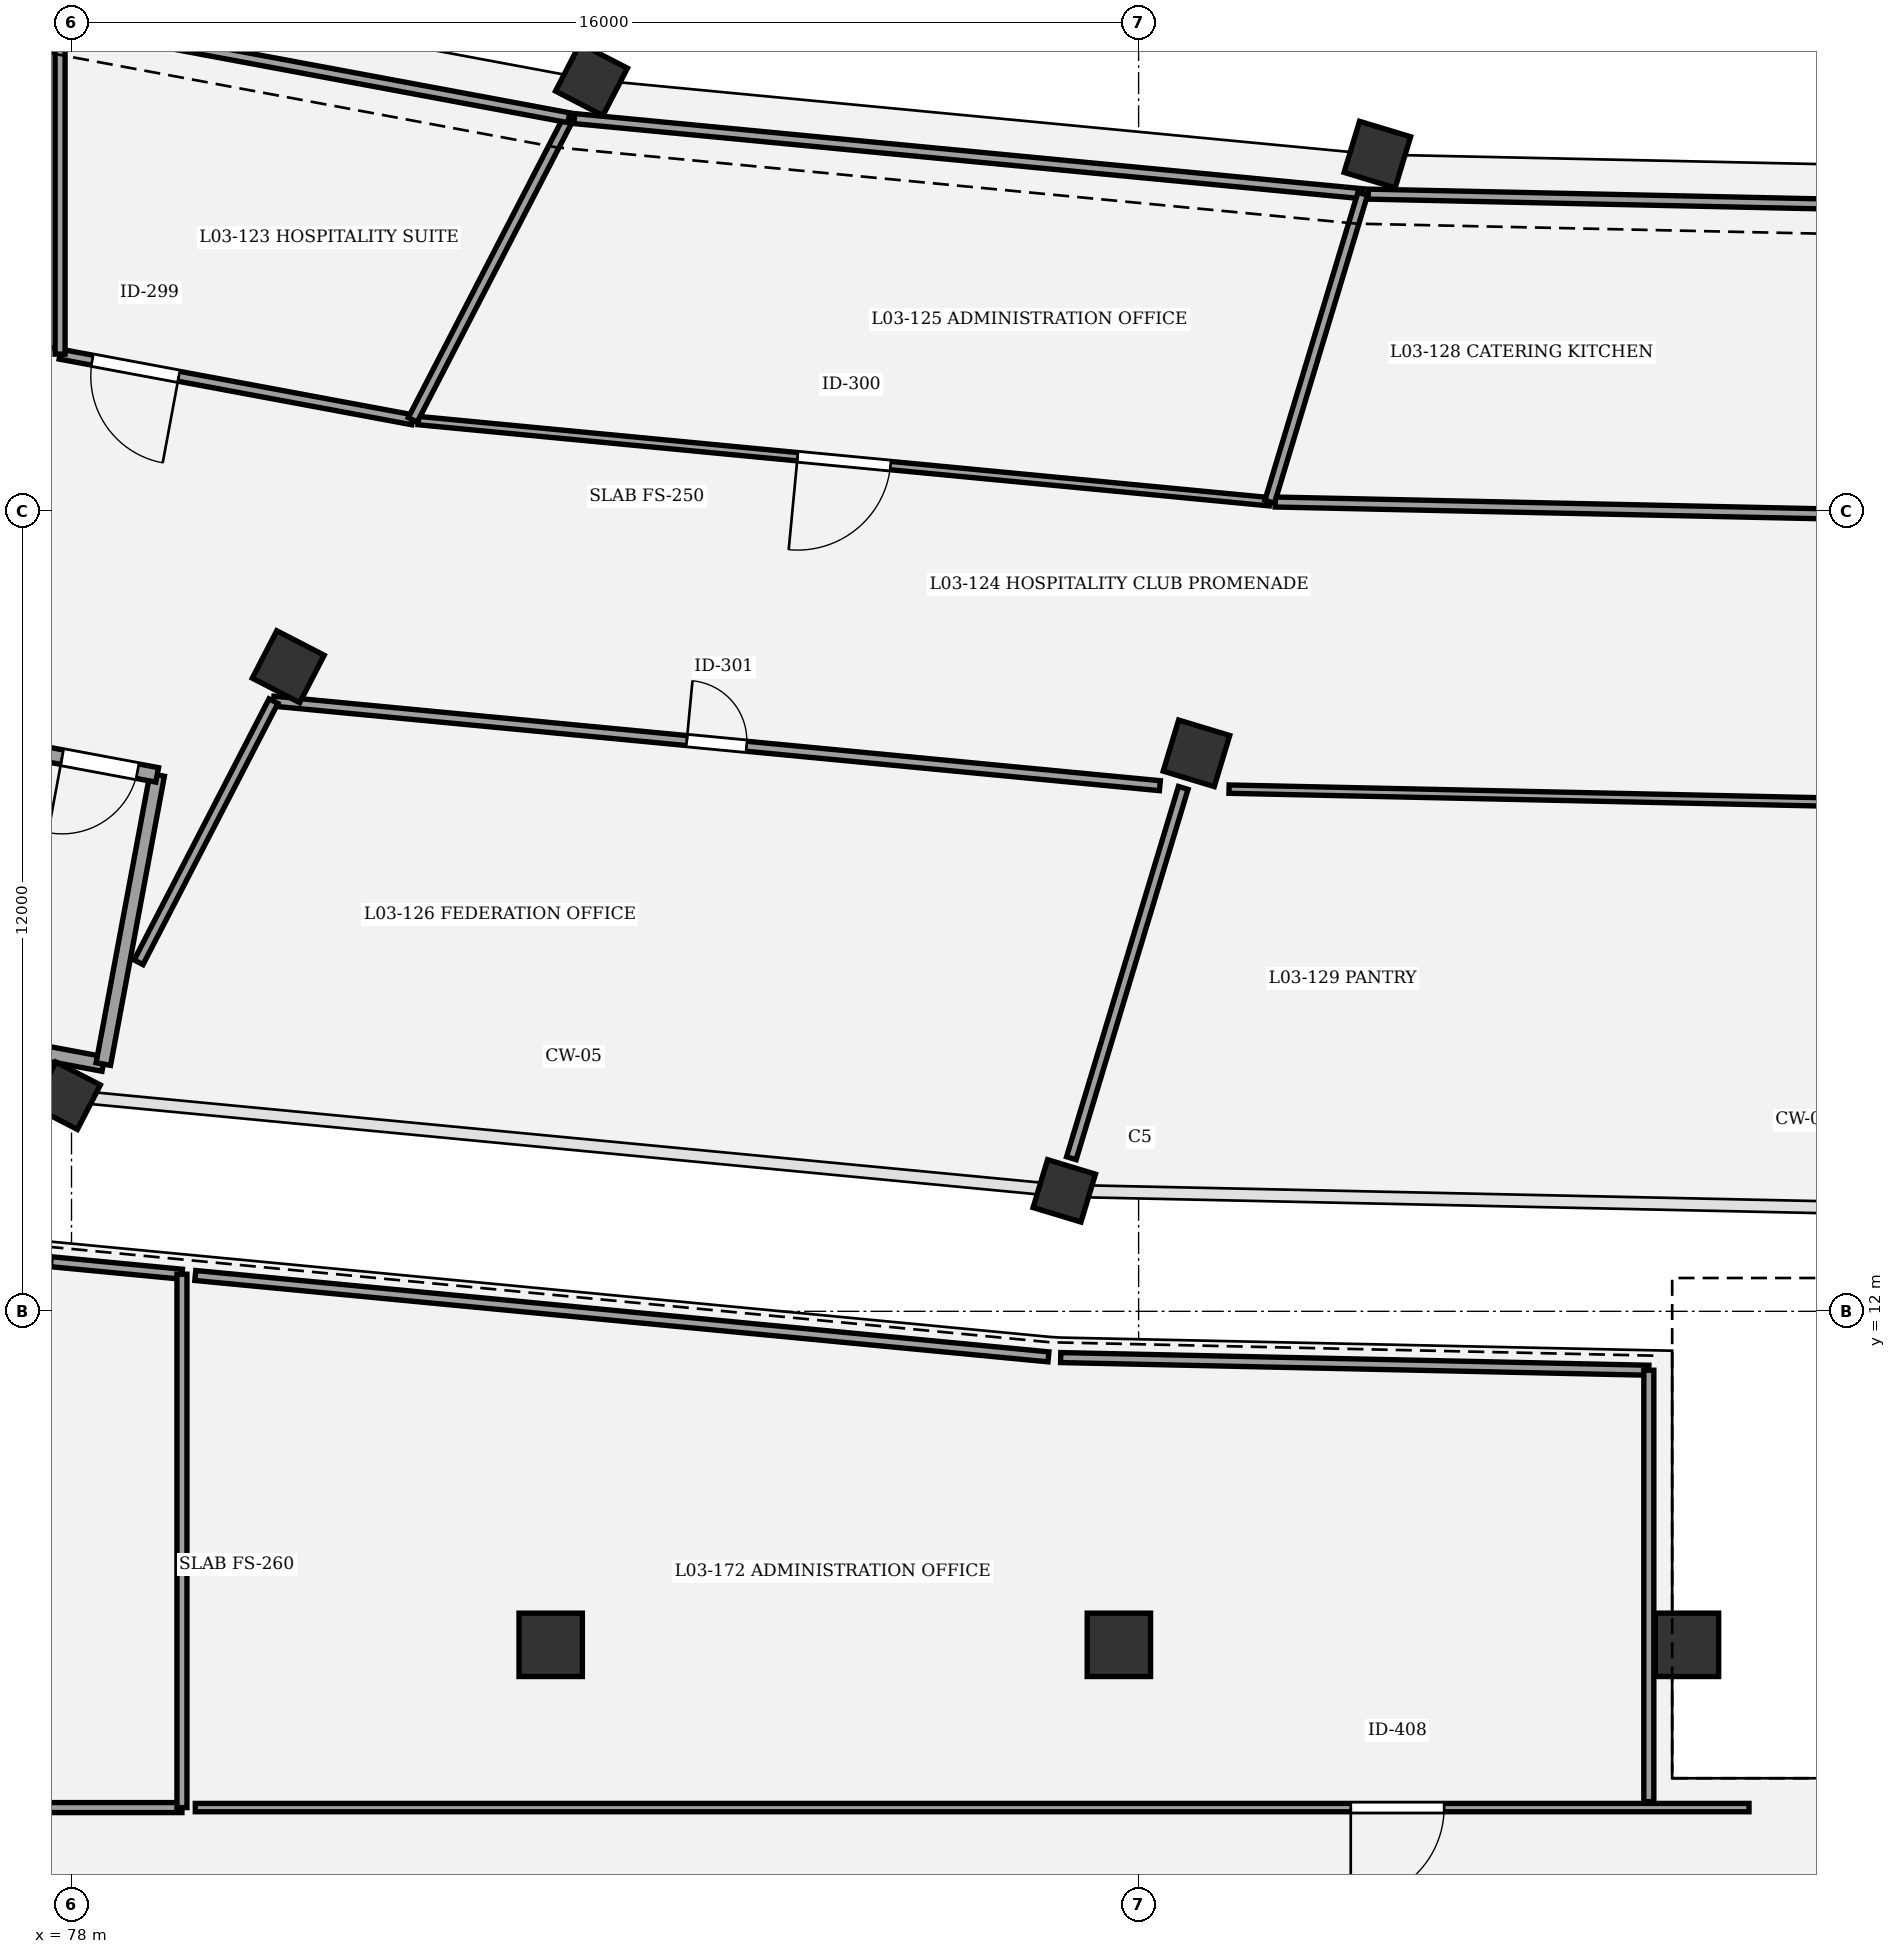
"""IFC4 building model, lengths in metres.
Left out: names, types, materials, properties, quantities, classifications, styles, units other than length and angle.
Written with IfcOpenShell. Run it as: python <this file> out.ifc"""

import sys

from ifc_helpers import new_model, si_unit, direction, frame, frame_2d, origin, origin_2d, place, context, subcontext, project, spatial, rectangle, circle, extrude, element, fill, save


model = new_model("IFC4")
c1 = context("Model", 3, precision=1e-05, world=origin(), true_north=direction((0.0, 1.0)))
c2 = subcontext(c1, "Body", "Model", "MODEL_VIEW")
j1 = project(units=[si_unit("LENGTHUNIT", "METRE"), si_unit("PLANEANGLEUNIT", "RADIAN")], contexts=[c1])
p1 = place(None, origin())
s1 = spatial("IfcSite", under=j1, at=p1, CompositionType="ELEMENT")
p2 = place(p1, origin())
s2 = spatial("IfcBuilding", under=s1, at=p2, CompositionType="ELEMENT")
p3 = place(p2, frame((0.0, 0.0, 14.7)))
s3 = spatial("IfcBuildingStorey", under=s2, at=p3, CompositionType="ELEMENT", Elevation=14.7)
p4 = place(p3, frame((85.796, 30.466, 0.0), z_axis=(0.0, 0.0, 1.0), x_axis=(-0.458959712465, -0.888457079624, 0.0)))
e1 = element("IfcColumn", 1, at=p4, inside=s3, PredefinedType="COLUMN", context=c2, shape_type="SweptSolid", body=[
    extrude(rectangle(XDim=0.8, YDim=0.8, at=origin_2d()), origin(), (0.0, 0.0, 1.0), 2.85),
])
p5 = place(p3, frame((81.25, 21.665, 0.0), z_axis=(0.0, 0.0, 1.0), x_axis=(-0.458959712465, -0.888457079624, 0.0)))
e2 = element("IfcColumn", 2, at=p5, inside=s3, PredefinedType="COLUMN", context=c2, shape_type="SweptSolid", body=[
    extrude(rectangle(XDim=0.8, YDim=0.8, at=origin_2d()), origin(), (0.0, 0.0, 1.0), 4.5),
])
p6 = place(p3, frame((77.927, 15.233, 0.0), z_axis=(0.0, 0.0, 1.0), x_axis=(-0.458959712465, -0.888457079624, 0.0)))
e3 = element("IfcColumn", 3, at=p6, inside=s3, PredefinedType="COLUMN", context=c2, shape_type="SweptSolid", body=[
    extrude(rectangle(XDim=0.75, YDim=0.75, at=origin_2d()), origin(), (0.0, 0.0, 1.0), 4.5),
])
p7 = place(p3, frame((97.58, 29.343, 0.0), z_axis=(0.0, 0.0, 1.0), x_axis=(-0.289198876314, -0.957269037387, 0.0)))
e4 = element("IfcColumn", 4, at=p7, inside=s3, PredefinedType="COLUMN", context=c2, shape_type="SweptSolid", body=[
    extrude(rectangle(XDim=0.8, YDim=0.8, at=origin_2d()), origin(), (0.0, 0.0, 1.0), 2.85),
])
p8 = place(p3, frame((94.867, 20.366, 0.0), z_axis=(0.0, 0.0, 1.0), x_axis=(-0.289198876314, -0.957269037387, 0.0)))
e5 = element("IfcColumn", 5, at=p8, inside=s3, PredefinedType="COLUMN", context=c2, shape_type="SweptSolid", body=[
    extrude(rectangle(XDim=0.8, YDim=0.8, at=origin_2d()), origin(), (0.0, 0.0, 1.0), 4.5),
])
p9 = place(p3, frame((92.885, 13.806, 0.0), z_axis=(0.0, 0.0, 1.0), x_axis=(-0.289198876314, -0.957269037387, 0.0)))
e6 = element("IfcColumn", 6, at=p9, inside=s3, PredefinedType="COLUMN", context=c2, shape_type="SweptSolid", body=[
    extrude(rectangle(XDim=0.75, YDim=0.75, at=origin_2d()), origin(), (0.0, 0.0, 1.0), 4.5),
])
for number, where, z_axis, x_axis in (
    (7, (85.185, 7.0, 0.0), (0.0, 0.0, 1.0), (1.0, 0.0, 0.0)),
    (8, (93.704, 7.0, 0.0), (0.0, 0.0, 1.0), (1.0, 0.0, 0.0)),
    (9, (102.222, 7.0, 0.0), (0.0, 0.0, 1.0), (1.0, 0.0, 0.0)),
):
    element("IfcColumn", number, at=place(p3, frame(where, z_axis=z_axis, x_axis=x_axis)), inside=s3, PredefinedType="COLUMN", context=c2, shape_type="SweptSolid", body=[
        extrude(circle(Radius=0.475, at=origin_2d()), origin(), (0.0, 0.0, 1.0), 4.5),
    ])
p10 = place(p3, frame((78.477, 15.707, 0.0), z_axis=(0.0, 0.0, 1.0), x_axis=(-0.983093434234, 0.183104613723, 0.0)))
e10 = element("IfcWall", 10, at=p10, inside=s3, PredefinedType="SHEAR", context=c2, shape_type="SweptSolid", body=[
    extrude(rectangle(XDim=11.02, YDim=0.22, at=frame_2d((5.51, 0.0))), origin(), (0.0, 0.0, 1.0), 4.25),
])
p11 = place(p3, frame((79.285, 20.043, 0.0), z_axis=(0.0, 0.0, 1.0), x_axis=(-0.183078394814, -0.983098317236, 0.0)))
e11 = element("IfcWall", 11, at=p11, inside=s3, PredefinedType="SHEAR", context=c2, shape_type="SweptSolid", body=[
    extrude(rectangle(XDim=4.41, YDim=0.22, at=frame_2d((2.205, 0.0))), origin(), (0.0, 0.0, 1.0), 4.25),
])
p12 = place(p3, frame((79.285, 20.043, 0.0), z_axis=(0.0, 0.0, 1.0), x_axis=(-0.983093434234, 0.183104613723, 0.0)))
e12 = element("IfcWall", 12, at=p12, inside=s3, PredefinedType="SHEAR", context=c2, shape_type="SweptSolid", body=[
    extrude(rectangle(XDim=11.02, YDim=0.22, at=frame_2d((5.51, 0.0))), origin(), (0.0, 0.0, 1.0), 4.25),
])
p13 = place(p12, frame((0.3, 0.0, 0.0)))
e13 = element("IfcOpeningElement", 13, at=p13, cuts=e12, PredefinedType="OPENING", context=c2, shape_type="SweptSolid", body=[
    extrude(rectangle(XDim=1.15, YDim=2.15, at=frame_2d((0.575, 1.075))), frame((0.0, 0.12, 0.0), z_axis=(0.0, -1.0, 0.0), x_axis=(1.0, 0.0, 0.0)), (0.0, 0.0, 1.0), 0.24),
])
p14 = place(p12, frame((9.23, 0.0, 0.0)))
e14 = element("IfcOpeningElement", 14, at=p14, cuts=e12, PredefinedType="OPENING", context=c2, shape_type="SweptSolid", body=[
    extrude(rectangle(XDim=1.1, YDim=2.15, at=frame_2d((0.55, 1.075))), frame((0.0, 0.12, 0.0), z_axis=(0.0, -1.0, 0.0), x_axis=(1.0, 0.0, 0.0)), (0.0, 0.0, 1.0), 0.24),
])
p15 = place(p3, frame((83.116, 25.365, 0.0), z_axis=(0.0, 0.0, 1.0), x_axis=(-0.983102134935, 0.183057893263, 0.0)))
e15 = element("IfcWall", 15, at=p15, inside=s3, PredefinedType="PARTITIONING", context=c2, shape_type="SweptSolid", body=[
    extrude(rectangle(XDim=5.379, YDim=0.15, at=frame_2d((2.689, 0.0))), origin(), (0.0, 0.0, 1.0), 3.25),
])
p16 = place(p15, frame((3.568, 0.0, 0.0)))
e16 = element("IfcOpeningElement", 16, at=p16, cuts=e15, PredefinedType="OPENING", context=c2, shape_type="SweptSolid", body=[
    extrude(rectangle(XDim=1.32, YDim=2.1, at=frame_2d((0.66, 1.05))), frame((0.0, 0.085, 0.0), z_axis=(0.0, -1.0, 0.0), x_axis=(1.0, 0.0, 0.0)), (0.0, 0.0, 1.0), 0.17),
])
p17 = place(p3, frame((95.965, 24.138, 0.0), z_axis=(0.0, 0.0, 1.0), x_axis=(-0.995485111947, 0.094917816515, 0.0)))
e17 = element("IfcWall", 17, at=p17, inside=s3, PredefinedType="PARTITIONING", context=c2, shape_type="SweptSolid", body=[
    extrude(rectangle(XDim=12.822, YDim=0.125, at=frame_2d((6.411, 0.0))), origin(), (0.0, 0.0, 1.0), 3.25),
])
p18 = place(p17, frame((5.711, 0.0, 0.0)))
e18 = element("IfcOpeningElement", 18, at=p18, cuts=e17, PredefinedType="OPENING", context=c2, shape_type="SweptSolid", body=[
    extrude(rectangle(XDim=1.4, YDim=2.1, at=frame_2d((0.7, 1.05))), frame((0.0, 0.073, 0.0), z_axis=(0.0, -1.0, 0.0), x_axis=(1.0, 0.0, 0.0)), (0.0, 0.0, 1.0), 0.145),
])
p19 = place(p3, frame((81.028, 21.148, 0.0), z_axis=(0.0, 0.0, 1.0), x_axis=(0.995484535327, -0.094923863827, 0.0)))
e19 = element("IfcWall", 19, at=p19, inside=s3, PredefinedType="PARTITIONING", context=c2, shape_type="SweptSolid", body=[
    extrude(rectangle(XDim=13.351, YDim=0.15, at=frame_2d((6.676, 0.0))), origin(), (0.0, 0.0, 1.0), 3.25),
])
p20 = place(p19, frame((6.226, 0.0, 0.0)))
e20 = element("IfcOpeningElement", 20, at=p20, cuts=e19, PredefinedType="OPENING", context=c2, shape_type="SweptSolid", body=[
    extrude(rectangle(XDim=0.9, YDim=2.2, at=frame_2d((0.45, 1.1))), frame((0.0, 0.085, 0.0), z_axis=(0.0, -1.0, 0.0), x_axis=(1.0, 0.0, 0.0)), (0.0, 0.0, 1.0), 0.17),
])
p21 = place(p3, frame((114.96, 23.726, 0.0), z_axis=(0.0, 0.0, 1.0), x_axis=(-0.999768266483, 0.021527037261, 0.0)))
e21 = element("IfcWall", 21, at=p21, inside=s3, PredefinedType="PARTITIONING", context=c2, shape_type="SweptSolid", body=[
    extrude(rectangle(XDim=18.917, YDim=0.15, at=frame_2d((9.458, 0.0))), origin(), (0.0, 0.0, 1.0), 3.25),
])
p22 = place(p21, frame((8.989, 0.0, 0.0)))
e22 = element("IfcOpeningElement", 22, at=p22, cuts=e21, PredefinedType="OPENING", context=c2, shape_type="SweptSolid", body=[
    extrude(rectangle(XDim=0.94, YDim=2.2, at=frame_2d((0.47, 1.1))), frame((0.0, 0.085, 0.0), z_axis=(0.0, -1.0, 0.0), x_axis=(1.0, 0.0, 0.0)), (0.0, 0.0, 1.0), 0.17),
])
p23 = place(p3, frame((95.356, 19.829, 0.0), z_axis=(0.0, 0.0, 1.0), x_axis=(0.999768107727, -0.021534409017, 0.0)))
e23 = element("IfcWall", 23, at=p23, inside=s3, PredefinedType="PARTITIONING", context=c2, shape_type="SweptSolid", body=[
    extrude(rectangle(XDim=19.137, YDim=0.125, at=frame_2d((9.569, 0.0))), origin(), (0.0, 0.0, 1.0), 3.25),
])
p24 = place(p23, frame((9.079, 0.0, 0.0)))
e24 = element("IfcOpeningElement", 24, at=p24, cuts=e23, PredefinedType="OPENING", context=c2, shape_type="SweptSolid", body=[
    extrude(rectangle(XDim=0.98, YDim=2.2, at=frame_2d((0.49, 1.1))), frame((0.0, 0.073, 0.0), z_axis=(0.0, -1.0, 0.0), x_axis=(1.0, 0.0, 0.0)), (0.0, 0.0, 1.0), 0.145),
])
p25 = place(p3, frame((79.656, 4.56, 0.0), z_axis=(0.0, 0.0, 1.0), x_axis=(-1.0, 0.0, 0.0)))
e25 = element("IfcWall", 25, at=p25, inside=s3, PredefinedType="PARTITIONING", context=c2, shape_type="SweptSolid", body=[
    extrude(rectangle(XDim=23.296, YDim=0.15, at=frame_2d((11.648, 0.0))), origin(), (0.0, 0.0, 1.0), 3.25),
])
p26 = place(p25, frame((14.188, 0.0, 0.0)))
e26 = element("IfcOpeningElement", 26, at=p26, cuts=e25, PredefinedType="OPENING", context=c2, shape_type="SweptSolid", body=[
    extrude(rectangle(XDim=1.32, YDim=2.1, at=frame_2d((0.66, 1.05))), frame((0.0, 0.085, 0.0), z_axis=(0.0, -1.0, 0.0), x_axis=(1.0, 0.0, 0.0)), (0.0, 0.0, 1.0), 0.17),
])
p27 = place(p3, frame((103.152, 4.56, 0.0), z_axis=(0.0, 0.0, 1.0), x_axis=(-1.0, 0.0, 0.0)))
e27 = element("IfcWall", 27, at=p27, inside=s3, PredefinedType="PARTITIONING", context=c2, shape_type="SweptSolid", body=[
    extrude(rectangle(XDim=23.296, YDim=0.125, at=frame_2d((11.648, 0.0))), origin(), (0.0, 0.0, 1.0), 3.25),
])
p28 = place(p27, frame((4.571, 0.0, 0.0)))
e28 = element("IfcOpeningElement", 28, at=p28, cuts=e27, PredefinedType="OPENING", context=c2, shape_type="SweptSolid", body=[
    extrude(rectangle(XDim=1.4, YDim=2.1, at=frame_2d((0.7, 1.05))), frame((0.0, 0.073, 0.0), z_axis=(0.0, -1.0, 0.0), x_axis=(1.0, 0.0, 0.0)), (0.0, 0.0, 1.0), 0.145),
])
p29 = place(p3, frame((85.456, 29.895, 0.0), z_axis=(0.0, 0.0, 1.0), x_axis=(-0.458955164524, -0.888459428987, 0.0)))
e29 = element("IfcWall", 29, at=p29, inside=s3, PredefinedType="PARTITIONING", context=c2, shape_type="SweptSolid", body=[
    extrude(rectangle(XDim=5.098, YDim=0.15, at=frame_2d((2.549, 0.0))), origin(), (0.0, 0.0, 1.0), 3.25),
])
p30 = place(p3, frame((77.829, 26.35, 0.0), z_axis=(0.0, 0.0, 1.0), x_axis=(0.0, 1.0, 0.0)))
e30 = element("IfcWall", 30, at=p30, inside=s3, PredefinedType="PARTITIONING", context=c2, shape_type="SweptSolid", body=[
    extrude(rectangle(XDim=4.966, YDim=0.15, at=frame_2d((2.483, 0.0))), origin(), (0.0, 0.0, 1.0), 3.25),
])
p31 = place(p3, frame((77.829, 31.316, 0.0), z_axis=(0.0, 0.0, 1.0), x_axis=(0.983094106907, -0.183101002083, 0.0)))
e31 = element("IfcWall", 31, at=p31, inside=s3, PredefinedType="PARTITIONING", context=c2, shape_type="SweptSolid", body=[
    extrude(rectangle(XDim=7.759, YDim=0.15, at=frame_2d((3.879, 0.0))), origin(), (0.0, 0.0, 1.0), 3.25),
])
p32 = place(p3, frame((85.54, 29.882, 0.0), z_axis=(0.0, 0.0, 1.0), x_axis=(0.995483914052, -0.094930379031, 0.0)))
e32 = element("IfcWall", 32, at=p32, inside=s3, PredefinedType="PARTITIONING", context=c2, shape_type="SweptSolid", body=[
    extrude(rectangle(XDim=11.874, YDim=0.15, at=frame_2d((5.937, 0.0))), origin(), (0.0, 0.0, 1.0), 3.25),
])
p33 = place(p3, frame((97.36, 28.755, 0.0), z_axis=(0.0, 0.0, 1.0), x_axis=(-0.289223400142, -0.957261628193, 0.0)))
e33 = element("IfcWall", 33, at=p33, inside=s3, PredefinedType="PARTITIONING", context=c2, shape_type="SweptSolid", body=[
    extrude(rectangle(XDim=4.823, YDim=0.15, at=frame_2d((2.412, 0.0))), origin(), (0.0, 0.0, 1.0), 3.25),
])
p34 = place(p3, frame((79.006, 17.233, 0.0), z_axis=(0.0, 0.0, 1.0), x_axis=(0.458942068402, 0.888466193983, 0.0)))
e34 = element("IfcWall", 34, at=p34, inside=s3, PredefinedType="PARTITIONING", context=c2, shape_type="SweptSolid", body=[
    extrude(rectangle(XDim=4.407, YDim=0.15, at=frame_2d((2.203, 0.0))), origin(), (0.0, 0.0, 1.0), 3.25),
])
p35 = place(p3, frame((94.669, 19.847, 0.0), z_axis=(0.0, 0.0, 1.0), x_axis=(-0.289236092688, -0.957257793223, 0.0)))
e35 = element("IfcWall", 35, at=p35, inside=s3, PredefinedType="PARTITIONING", context=c2, shape_type="SweptSolid", body=[
    extrude(rectangle(XDim=5.799, YDim=0.15, at=frame_2d((2.899, 0.0))), origin(), (0.0, 0.0, 1.0), 3.25),
])
p36 = place(p3, frame((97.442, 28.75, 0.0), z_axis=(0.0, 0.0, 1.0), x_axis=(0.999768262744, -0.021527210931, 0.0)))
e36 = element("IfcWall", 36, at=p36, inside=s3, PredefinedType="PARTITIONING", context=c2, shape_type="SweptSolid", body=[
    extrude(rectangle(XDim=17.522, YDim=0.15, at=frame_2d((8.761, 0.0))), origin(), (0.0, 0.0, 1.0), 3.25),
])
p37 = place(p3, frame((77.69, 12.744, 0.0), z_axis=(0.0, 0.0, 1.0), x_axis=(0.995483241572, -0.094937430712, 0.0)))
e37 = element("IfcWall", 37, at=p37, inside=s3, PredefinedType="PARTITIONING", context=c2, shape_type="SweptSolid", body=[
    extrude(rectangle(XDim=1.975, YDim=0.15, at=frame_2d((0.988, 0.0))), origin(), (0.0, 0.0, 1.0), 3.25),
])
p38 = place(p3, frame((79.656, 12.556, 0.0), z_axis=(0.0, 0.0, 1.0), x_axis=(0.0, -1.0, 0.0)))
e38 = element("IfcWall", 38, at=p38, inside=s3, PredefinedType="PARTITIONING", context=c2, shape_type="SweptSolid", body=[
    extrude(rectangle(XDim=7.996, YDim=0.15, at=frame_2d((3.998, 0.0))), origin(), (0.0, 0.0, 1.0), 3.25),
])
p39 = place(p3, frame((92.832, 11.307, 0.0), z_axis=(0.0, 0.0, 1.0), x_axis=(0.999768109674, -0.021534318641, 0.0)))
e39 = element("IfcWall", 39, at=p39, inside=s3, PredefinedType="PARTITIONING", context=c2, shape_type="SweptSolid", body=[
    extrude(rectangle(XDim=8.82, YDim=0.15, at=frame_2d((4.41, 0.0))), origin(), (0.0, 0.0, 1.0), 3.25),
])
p40 = place(p3, frame((101.65, 11.117, 0.0), z_axis=(0.0, 0.0, 1.0), x_axis=(0.0, -1.0, 0.0)))
e40 = element("IfcWall", 40, at=p40, inside=s3, PredefinedType="PARTITIONING", context=c2, shape_type="SweptSolid", body=[
    extrude(rectangle(XDim=6.467, YDim=0.15, at=frame_2d((3.233, 0.0))), origin(), (0.0, 0.0, 1.0), 3.25),
])
p41 = place(p3, frame((79.856, 12.537, 0.0), z_axis=(0.0, 0.0, 1.0), x_axis=(0.995483253835, -0.094937302124, 0.0)))
e41 = element("IfcWall", 41, at=p41, inside=s3, PredefinedType="PARTITIONING", context=c2, shape_type="SweptSolid", body=[
    extrude(rectangle(XDim=12.85, YDim=0.15, at=frame_2d((6.425, 0.0))), origin(), (0.0, 0.0, 1.0), 3.25),
])
p42 = place(p13, origin())
e42 = element("IfcDoor", 42, at=p42, inside=s3, OperationType="SINGLE_SWING_RIGHT", PredefinedType="DOOR", context=c2, shape_type="SweptSolid", body=[
    extrude(rectangle(XDim=1.15, YDim=2.15, at=frame_2d((0.575, 1.075))), frame((0.0, 0.025, 0.0), z_axis=(0.0, -1.0, 0.0), x_axis=(1.0, 0.0, 0.0)), (0.0, 0.0, 1.0), 0.05),
])
fill(e13, e42)
p43 = place(p16, origin())
e43 = element("IfcDoor", 43, at=p43, inside=s3, OperationType="SINGLE_SWING_LEFT", PredefinedType="DOOR", context=c2, shape_type="SweptSolid", body=[
    extrude(rectangle(XDim=1.32, YDim=2.1, at=frame_2d((0.66, 1.05))), frame((0.0, 0.025, 0.0), z_axis=(0.0, -1.0, 0.0), x_axis=(1.0, 0.0, 0.0)), (0.0, 0.0, 1.0), 0.05),
])
fill(e16, e43)
p44 = place(p18, origin())
e44 = element("IfcDoor", 44, at=p44, inside=s3, OperationType="SINGLE_SWING_RIGHT", PredefinedType="DOOR", context=c2, shape_type="SweptSolid", body=[
    extrude(rectangle(XDim=1.4, YDim=2.1, at=frame_2d((0.7, 1.05))), frame((0.0, 0.025, 0.0), z_axis=(0.0, -1.0, 0.0), x_axis=(1.0, 0.0, 0.0)), (0.0, 0.0, 1.0), 0.05),
])
fill(e18, e44)
p45 = place(p20, origin())
e45 = element("IfcDoor", 45, at=p45, inside=s3, OperationType="SINGLE_SWING_LEFT", PredefinedType="DOOR", context=c2, shape_type="SweptSolid", body=[
    extrude(rectangle(XDim=0.9, YDim=2.2, at=frame_2d((0.45, 1.1))), frame((0.0, 0.025, 0.0), z_axis=(0.0, -1.0, 0.0), x_axis=(1.0, 0.0, 0.0)), (0.0, 0.0, 1.0), 0.05),
])
fill(e20, e45)
p46 = place(p28, origin())
e46 = element("IfcDoor", 46, at=p46, inside=s3, OperationType="SINGLE_SWING_RIGHT", PredefinedType="DOOR", context=c2, shape_type="SweptSolid", body=[
    extrude(rectangle(XDim=1.4, YDim=2.1, at=frame_2d((0.7, 1.05))), frame((0.0, 0.025, 0.0), z_axis=(0.0, -1.0, 0.0), x_axis=(1.0, 0.0, 0.0)), (0.0, 0.0, 1.0), 0.05),
])
fill(e28, e46)
save(model, sys.argv[1])
